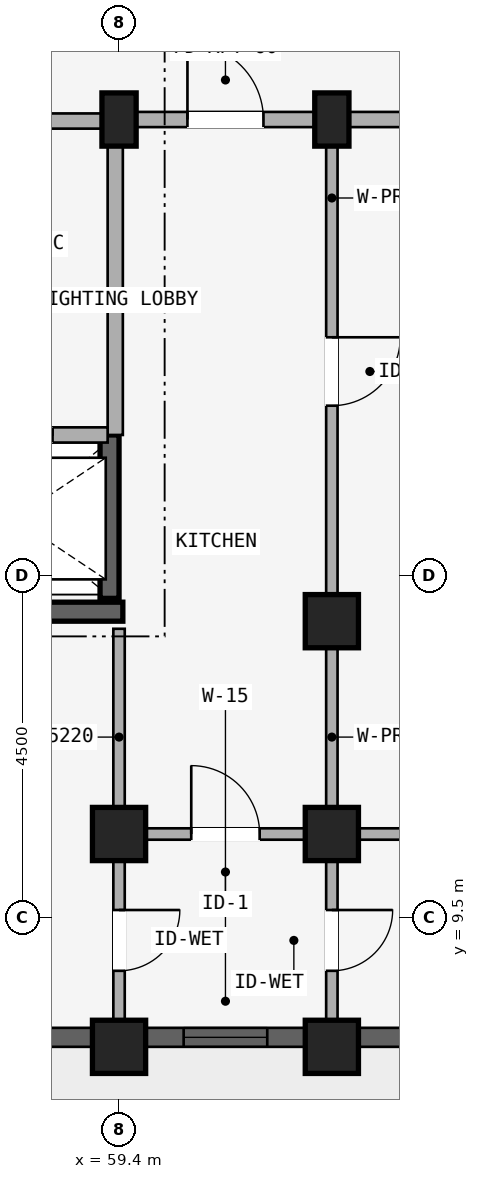
"""IFC4 building model, lengths in metres.
Left out: names, types, materials, properties, quantities, classifications, styles, units other than length and angle.
Written with IfcOpenShell. Run it as: python <this file> out.ifc"""

import sys

from ifc_helpers import new_model, si_unit, direction, frame, frame_2d, origin, origin_2d, place, context, subcontext, project, spatial, rectangle, extrude, element, fill, save


model = new_model("IFC4")
c1 = context("Model", 3, precision=1e-05, world=origin(), true_north=direction((0.0, 1.0)))
c2 = subcontext(c1, "Body", "Model", "MODEL_VIEW")
j1 = project(units=[si_unit("LENGTHUNIT", "METRE"), si_unit("PLANEANGLEUNIT", "RADIAN")], contexts=[c1])
p1 = place(None, origin())
s1 = spatial("IfcSite", under=j1, at=p1, CompositionType="ELEMENT")
p2 = place(p1, origin())
s2 = spatial("IfcBuilding", under=s1, at=p2, CompositionType="ELEMENT")
p3 = place(p2, frame((0.0, 0.0, 24.45)))
s3 = spatial("IfcBuildingStorey", under=s2, at=p3, CompositionType="ELEMENT", Elevation=24.45)
p4 = place(p3, frame((56.65, 13.525, 0.0), z_axis=(0.0, 0.0, 1.0), x_axis=(1.0, 0.0, 0.0)))
e1 = element("IfcWall", 1, at=p4, inside=s3, PredefinedType="SHEAR", context=c2, shape_type="SweptSolid", body=[
    extrude(rectangle(XDim=2.8, YDim=0.25, at=frame_2d((1.4, 0.0))), origin(), (0.0, 0.0, 1.0), 2.93),
])
p5 = place(p3, frame((59.275, 15.85, 0.0), z_axis=(0.0, 0.0, 1.0), x_axis=(0.0, -1.0, 0.0)))
e2 = element("IfcWall", 2, at=p5, inside=s3, PredefinedType="SHEAR", context=c2, shape_type="SweptSolid", body=[
    extrude(rectangle(XDim=2.15, YDim=0.25, at=frame_2d((1.075, 0.0))), origin(), (0.0, 0.0, 1.0), 2.93),
])
p6 = place(p3, frame((59.4, 20.0, 0.0), z_axis=(0.0, 0.0, 1.0), x_axis=(1.0, 0.0, 0.0)))
e3 = element("IfcColumn", 3, at=p6, inside=s3, PredefinedType="COLUMN", context=c2, shape_type="SweptSolid", body=[
    extrude(rectangle(XDim=0.45, YDim=0.7, at=origin_2d()), origin(), (0.0, 0.0, 1.0), 2.93),
])
p7 = place(p3, frame((59.4, 10.6, 0.0), z_axis=(0.0, 0.0, 1.0), x_axis=(1.0, 0.0, 0.0)))
e4 = element("IfcColumn", 4, at=p7, inside=s3, PredefinedType="COLUMN", context=c2, shape_type="SweptSolid", body=[
    extrude(rectangle(XDim=0.7, YDim=0.7, at=origin_2d()), origin(), (0.0, 0.0, 1.0), 2.93),
])
p8 = place(p3, frame((59.4, 7.8, 0.0), z_axis=(0.0, 0.0, 1.0), x_axis=(1.0, 0.0, 0.0)))
e5 = element("IfcColumn", 5, at=p8, inside=s3, PredefinedType="COLUMN", context=c2, shape_type="SweptSolid", body=[
    extrude(rectangle(XDim=0.7, YDim=0.7, at=origin_2d()), origin(), (0.0, 0.0, 1.0), 2.97),
])
p9 = place(p3, frame((62.2, 20.0, 0.0), z_axis=(0.0, 0.0, 1.0), x_axis=(1.0, 0.0, 0.0)))
e6 = element("IfcColumn", 6, at=p9, inside=s3, PredefinedType="COLUMN", context=c2, shape_type="SweptSolid", body=[
    extrude(rectangle(XDim=0.45, YDim=0.7, at=origin_2d()), origin(), (0.0, 0.0, 1.0), 2.93),
])
for number, where, z_axis, x_axis in (
    (7, (62.2, 13.4, 0.0), (0.0, 0.0, 1.0), (1.0, 0.0, 0.0)),
    (8, (62.2, 10.6, 0.0), (0.0, 0.0, 1.0), (1.0, 0.0, 0.0)),
):
    element("IfcColumn", number, at=place(p3, frame(where, z_axis=z_axis, x_axis=x_axis)), inside=s3, PredefinedType="COLUMN", context=c2, shape_type="SweptSolid", body=[
        extrude(rectangle(XDim=0.7, YDim=0.7, at=origin_2d()), origin(), (0.0, 0.0, 1.0), 2.93),
    ])
p10 = place(p3, frame((62.2, 7.8, 0.0), z_axis=(0.0, 0.0, 1.0), x_axis=(1.0, 0.0, 0.0)))
e9 = element("IfcColumn", 9, at=p10, inside=s3, PredefinedType="COLUMN", context=c2, shape_type="SweptSolid", body=[
    extrude(rectangle(XDim=0.7, YDim=0.7, at=origin_2d()), origin(), (0.0, 0.0, 1.0), 2.97),
])
p11 = place(p3, frame((53.7, 19.98, 0.0), z_axis=(0.0, 0.0, 1.0), x_axis=(1.0, 0.0, 0.0)))
e10 = element("IfcWall", 10, at=p11, inside=s3, PredefinedType="STANDARD", context=c2, shape_type="SweptSolid", body=[
    extrude(rectangle(XDim=5.65, YDim=0.2, at=frame_2d((2.825, 0.0))), origin(), (0.0, 0.0, 1.0), 2.372),
])
p12 = place(p11, frame((1.923, 0.0, 0.0)))
e11 = element("IfcOpeningElement", 11, at=p12, cuts=e10, PredefinedType="OPENING", context=c2, shape_type="SweptSolid", body=[
    extrude(rectangle(XDim=1.24, YDim=2.15, at=frame_2d((0.62, 1.075))), frame((0.0, 0.11, 0.0), z_axis=(0.0, -1.0, 0.0), x_axis=(1.0, 0.0, 0.0)), (0.0, 0.0, 1.0), 0.22),
])
p13 = place(p3, frame((59.35, 19.98, 0.0), z_axis=(0.0, 0.0, 1.0), x_axis=(0.0, -1.0, 0.0)))
e12 = element("IfcWall", 12, at=p13, inside=s3, PredefinedType="STANDARD", context=c2, shape_type="SweptSolid", body=[
    extrude(rectangle(XDim=4.13, YDim=0.2, at=frame_2d((2.065, 0.0))), origin(), (0.0, 0.0, 1.0), 2.372),
])
p14 = place(p3, frame((56.7, 15.85, 0.0), z_axis=(0.0, 0.0, 1.0), x_axis=(1.0, 0.0, 0.0)))
e13 = element("IfcWall", 13, at=p14, inside=s3, PredefinedType="STANDARD", context=c2, shape_type="SweptSolid", body=[
    extrude(rectangle(XDim=2.55, YDim=0.2, at=frame_2d((1.275, 0.0))), origin(), (0.0, 0.0, 1.0), 2.372),
])
p15 = place(p14, frame((0.725, 0.0, 0.0)))
e14 = element("IfcOpeningElement", 14, at=p15, cuts=e13, PredefinedType="OPENING", context=c2, shape_type="SweptSolid", body=[
    extrude(rectangle(XDim=1.1, YDim=2.15, at=frame_2d((0.55, 1.075))), frame((0.0, 0.11, 0.0), z_axis=(0.0, -1.0, 0.0), x_axis=(1.0, 0.0, 0.0)), (0.0, 0.0, 1.0), 0.22),
])
p16 = place(p3, frame((59.4, 20.0, 0.0), z_axis=(0.0, 0.0, 1.0), x_axis=(1.0, 0.0, 0.0)))
e15 = element("IfcWall", 15, at=p16, inside=s3, PredefinedType="STANDARD", context=c2, shape_type="SweptSolid", body=[
    extrude(rectangle(XDim=2.8, YDim=0.2, at=frame_2d((1.4, 0.0))), origin(), (0.0, 0.0, 1.0), 2.372),
])
p17 = place(p16, frame((0.9, 0.0, 0.0)))
e16 = element("IfcOpeningElement", 16, at=p17, cuts=e15, PredefinedType="OPENING", context=c2, shape_type="SweptSolid", body=[
    extrude(rectangle(XDim=1.0, YDim=2.15, at=frame_2d((0.5, 1.075))), frame((0.0, 0.11, 0.0), z_axis=(0.0, -1.0, 0.0), x_axis=(1.0, 0.0, 0.0)), (0.0, 0.0, 1.0), 0.22),
])
p18 = place(p3, frame((59.48, 10.6, 0.0), z_axis=(0.0, 0.0, 1.0), x_axis=(1.0, 0.0, 0.0)))
e17 = element("IfcWall", 17, at=p18, inside=s3, PredefinedType="PLUMBINGWALL", context=c2, shape_type="SweptSolid", body=[
    extrude(rectangle(XDim=2.64, YDim=0.15, at=frame_2d((1.32, 0.0))), origin(), (0.0, 0.0, 1.0), 2.372),
])
p19 = place(p18, frame((0.87, 0.0, 0.0)))
e18 = element("IfcOpeningElement", 18, at=p19, cuts=e17, PredefinedType="OPENING", context=c2, shape_type="SweptSolid", body=[
    extrude(rectangle(XDim=0.9, YDim=2.1, at=frame_2d((0.45, 1.05))), frame((0.0, 0.085, 0.0), z_axis=(0.0, -1.0, 0.0), x_axis=(1.0, 0.0, 0.0)), (0.0, 0.0, 1.0), 0.17),
])
p20 = place(p3, frame((62.2, 20.0, 0.0), z_axis=(0.0, 0.0, 1.0), x_axis=(1.0, 0.0, 0.0)))
e19 = element("IfcWall", 19, at=p20, inside=s3, PredefinedType="STANDARD", context=c2, shape_type="SweptSolid", body=[
    extrude(rectangle(XDim=2.8, YDim=0.2, at=frame_2d((1.4, 0.0))), origin(), (0.0, 0.0, 1.0), 2.372),
])
p21 = place(p3, frame((62.28, 10.6, 0.0), z_axis=(0.0, 0.0, 1.0), x_axis=(1.0, 0.0, 0.0)))
e20 = element("IfcWall", 20, at=p21, inside=s3, PredefinedType="PLUMBINGWALL", context=c2, shape_type="SweptSolid", body=[
    extrude(rectangle(XDim=2.64, YDim=0.15, at=frame_2d((1.32, 0.0))), origin(), (0.0, 0.0, 1.0), 2.372),
])
p22 = place(p21, frame((0.92, 0.0, 0.0)))
e21 = element("IfcOpeningElement", 21, at=p22, cuts=e20, PredefinedType="OPENING", context=c2, shape_type="SweptSolid", body=[
    extrude(rectangle(XDim=0.8, YDim=2.1, at=frame_2d((0.4, 1.05))), frame((0.0, 0.085, 0.0), z_axis=(0.0, -1.0, 0.0), x_axis=(1.0, 0.0, 0.0)), (0.0, 0.0, 1.0), 0.17),
])
p23 = place(p3, frame((59.4, 13.3, 0.0), z_axis=(0.0, 0.0, 1.0), x_axis=(0.0, -1.0, 0.0)))
e22 = element("IfcWall", 22, at=p23, inside=s3, PredefinedType="PARTITIONING", context=c2, shape_type="SweptSolid", body=[
    extrude(rectangle(XDim=5.22, YDim=0.15, at=frame_2d((2.61, 0.0))), origin(), (0.0, 0.0, 1.0), 2.372),
])
p24 = place(p23, frame((3.7, 0.0, 0.0)))
e23 = element("IfcOpeningElement", 23, at=p24, cuts=e22, PredefinedType="OPENING", context=c2, shape_type="SweptSolid", body=[
    extrude(rectangle(XDim=0.8, YDim=2.1, at=frame_2d((0.4, 1.05))), frame((0.0, 0.085, 0.0), z_axis=(0.0, -1.0, 0.0), x_axis=(1.0, 0.0, 0.0)), (0.0, 0.0, 1.0), 0.17),
])
p25 = place(p3, frame((62.2, 19.95, 0.0), z_axis=(0.0, 0.0, 1.0), x_axis=(0.0, -1.0, 0.0)))
e24 = element("IfcWall", 24, at=p25, inside=s3, PredefinedType="PARTITIONING", context=c2, shape_type="SweptSolid", body=[
    extrude(rectangle(XDim=6.53, YDim=0.15, at=frame_2d((3.265, 0.0))), origin(), (0.0, 0.0, 1.0), 2.372),
])
p26 = place(p25, frame((2.815, 0.0, 0.0)))
e25 = element("IfcOpeningElement", 25, at=p26, cuts=e24, PredefinedType="OPENING", context=c2, shape_type="SweptSolid", body=[
    extrude(rectangle(XDim=0.9, YDim=2.1, at=frame_2d((0.45, 1.05))), frame((0.0, 0.085, 0.0), z_axis=(0.0, -1.0, 0.0), x_axis=(1.0, 0.0, 0.0)), (0.0, 0.0, 1.0), 0.17),
])
p27 = place(p3, frame((62.2, 13.3, 0.0), z_axis=(0.0, 0.0, 1.0), x_axis=(0.0, -1.0, 0.0)))
e26 = element("IfcWall", 26, at=p27, inside=s3, PredefinedType="PARTITIONING", context=c2, shape_type="SweptSolid", body=[
    extrude(rectangle(XDim=5.22, YDim=0.15, at=frame_2d((2.61, 0.0))), origin(), (0.0, 0.0, 1.0), 2.372),
])
p28 = place(p27, frame((3.7, 0.0, 0.0)))
e27 = element("IfcOpeningElement", 27, at=p28, cuts=e26, PredefinedType="OPENING", context=c2, shape_type="SweptSolid", body=[
    extrude(rectangle(XDim=0.8, YDim=2.1, at=frame_2d((0.4, 1.05))), frame((0.0, 0.085, 0.0), z_axis=(0.0, -1.0, 0.0), x_axis=(1.0, 0.0, 0.0)), (0.0, 0.0, 1.0), 0.17),
])
p29 = place(p3, frame((54.154, 7.925, 0.0), z_axis=(0.0, 0.0, 1.0), x_axis=(1.0, 0.0, 0.0)))
e28 = element("IfcWall", 28, at=p29, inside=s3, PredefinedType="STANDARD", context=c2, shape_type="SweptSolid", body=[
    extrude(rectangle(XDim=4.893, YDim=0.25, at=frame_2d((2.446, 0.0))), origin(), (0.0, 0.0, 1.0), 2.48),
])
p30 = place(p29, frame((1.846, 0.0, 0.78)))
e29 = element("IfcOpeningElement", 29, at=p30, cuts=e28, PredefinedType="OPENING", context=c2, shape_type="SweptSolid", body=[
    extrude(rectangle(XDim=1.2, YDim=1.5, at=frame_2d((0.6, 0.75))), frame((0.0, 0.135, 0.0), z_axis=(0.0, -1.0, 0.0), x_axis=(1.0, 0.0, 0.0)), (0.0, 0.0, 1.0), 0.27),
])
p31 = place(p3, frame((59.753, 7.925, 0.0), z_axis=(0.0, 0.0, 1.0), x_axis=(1.0, 0.0, 0.0)))
e30 = element("IfcWall", 30, at=p31, inside=s3, PredefinedType="STANDARD", context=c2, shape_type="SweptSolid", body=[
    extrude(rectangle(XDim=2.093, YDim=0.25, at=frame_2d((1.046, 0.0))), origin(), (0.0, 0.0, 1.0), 2.48),
])
p32 = place(p31, frame((0.497, 0.0, 0.83)))
e31 = element("IfcOpeningElement", 31, at=p32, cuts=e30, PredefinedType="OPENING", context=c2, shape_type="SweptSolid", body=[
    extrude(rectangle(XDim=1.1, YDim=1.45, at=frame_2d((0.55, 0.725))), frame((0.0, 0.135, 0.0), z_axis=(0.0, -1.0, 0.0), x_axis=(1.0, 0.0, 0.0)), (0.0, 0.0, 1.0), 0.27),
])
p33 = place(p3, frame((62.553, 7.925, 0.0), z_axis=(0.0, 0.0, 1.0), x_axis=(1.0, 0.0, 0.0)))
e32 = element("IfcWall", 32, at=p33, inside=s3, PredefinedType="STANDARD", context=c2, shape_type="SweptSolid", body=[
    extrude(rectangle(XDim=2.093, YDim=0.25, at=frame_2d((1.046, 0.0))), origin(), (0.0, 0.0, 1.0), 2.48),
])
p34 = place(p33, frame((0.572, 0.0, 0.88)))
e33 = element("IfcOpeningElement", 33, at=p34, cuts=e32, PredefinedType="OPENING", context=c2, shape_type="SweptSolid", body=[
    extrude(rectangle(XDim=0.95, YDim=1.35, at=frame_2d((0.475, 0.675))), frame((0.0, 0.135, 0.0), z_axis=(0.0, -1.0, 0.0), x_axis=(1.0, 0.0, 0.0)), (0.0, 0.0, 1.0), 0.27),
])
p35 = place(p32, origin())
e34 = element("IfcWindow", 34, at=p35, inside=s3, PartitioningType="SINGLE_PANEL", PredefinedType="WINDOW", context=c2, shape_type="SweptSolid", body=[
    extrude(rectangle(XDim=1.1, YDim=1.45, at=frame_2d((0.55, 0.725))), frame((0.0, 0.03, 0.0), z_axis=(0.0, -1.0, 0.0), x_axis=(1.0, 0.0, 0.0)), (0.0, 0.0, 1.0), 0.06),
])
fill(e31, e34)
p36 = place(p15, origin())
e35 = element("IfcDoor", 35, at=p36, inside=s3, OperationType="SLIDING_TO_LEFT", PredefinedType="DOOR", context=c2, shape_type="SweptSolid", body=[
    extrude(rectangle(XDim=1.1, YDim=2.15, at=frame_2d((0.55, 1.075))), frame((0.0, 0.025, 0.0), z_axis=(0.0, -1.0, 0.0), x_axis=(1.0, 0.0, 0.0)), (0.0, 0.0, 1.0), 0.05),
])
fill(e14, e35)
p37 = place(p19, origin())
e36 = element("IfcDoor", 36, at=p37, inside=s3, OperationType="SINGLE_SWING_LEFT", PredefinedType="DOOR", context=c2, shape_type="SweptSolid", body=[
    extrude(rectangle(XDim=0.9, YDim=2.1, at=frame_2d((0.45, 1.05))), frame((0.0, 0.025, 0.0), z_axis=(0.0, -1.0, 0.0), x_axis=(1.0, 0.0, 0.0)), (0.0, 0.0, 1.0), 0.05),
])
fill(e18, e36)
p38 = place(p17, frame((1.0, 0.0, 0.0), z_axis=(0.0, 0.0, 1.0), x_axis=(-1.0, 0.0, 0.0)))
e37 = element("IfcDoor", 37, at=p38, inside=s3, OperationType="SINGLE_SWING_RIGHT", PredefinedType="DOOR", context=c2, shape_type="SweptSolid", body=[
    extrude(rectangle(XDim=1.0, YDim=2.15, at=frame_2d((0.5, 1.075))), frame((0.0, 0.025, 0.0), z_axis=(0.0, -1.0, 0.0), x_axis=(1.0, 0.0, 0.0)), (0.0, 0.0, 1.0), 0.05),
])
fill(e16, e37)
p39 = place(p24, frame((0.8, 0.0, 0.0), z_axis=(0.0, 0.0, 1.0), x_axis=(-1.0, 0.0, 0.0)))
e38 = element("IfcDoor", 38, at=p39, inside=s3, OperationType="SINGLE_SWING_RIGHT", PredefinedType="DOOR", context=c2, shape_type="SweptSolid", body=[
    extrude(rectangle(XDim=0.8, YDim=2.1, at=frame_2d((0.4, 1.05))), frame((0.0, 0.025, 0.0), z_axis=(0.0, -1.0, 0.0), x_axis=(1.0, 0.0, 0.0)), (0.0, 0.0, 1.0), 0.05),
])
fill(e23, e38)
p40 = place(p26, frame((0.9, 0.0, 0.0), z_axis=(0.0, 0.0, 1.0), x_axis=(-1.0, 0.0, 0.0)))
e39 = element("IfcDoor", 39, at=p40, inside=s3, OperationType="SINGLE_SWING_RIGHT", PredefinedType="DOOR", context=c2, shape_type="SweptSolid", body=[
    extrude(rectangle(XDim=0.9, YDim=2.1, at=frame_2d((0.45, 1.05))), frame((0.0, 0.025, 0.0), z_axis=(0.0, -1.0, 0.0), x_axis=(1.0, 0.0, 0.0)), (0.0, 0.0, 1.0), 0.05),
])
fill(e25, e39)
p41 = place(p28, origin())
e40 = element("IfcDoor", 40, at=p41, inside=s3, OperationType="SINGLE_SWING_LEFT", PredefinedType="DOOR", context=c2, shape_type="SweptSolid", body=[
    extrude(rectangle(XDim=0.8, YDim=2.1, at=frame_2d((0.4, 1.05))), frame((0.0, 0.025, 0.0), z_axis=(0.0, -1.0, 0.0), x_axis=(1.0, 0.0, 0.0)), (0.0, 0.0, 1.0), 0.05),
])
fill(e27, e40)
save(model, sys.argv[1])
